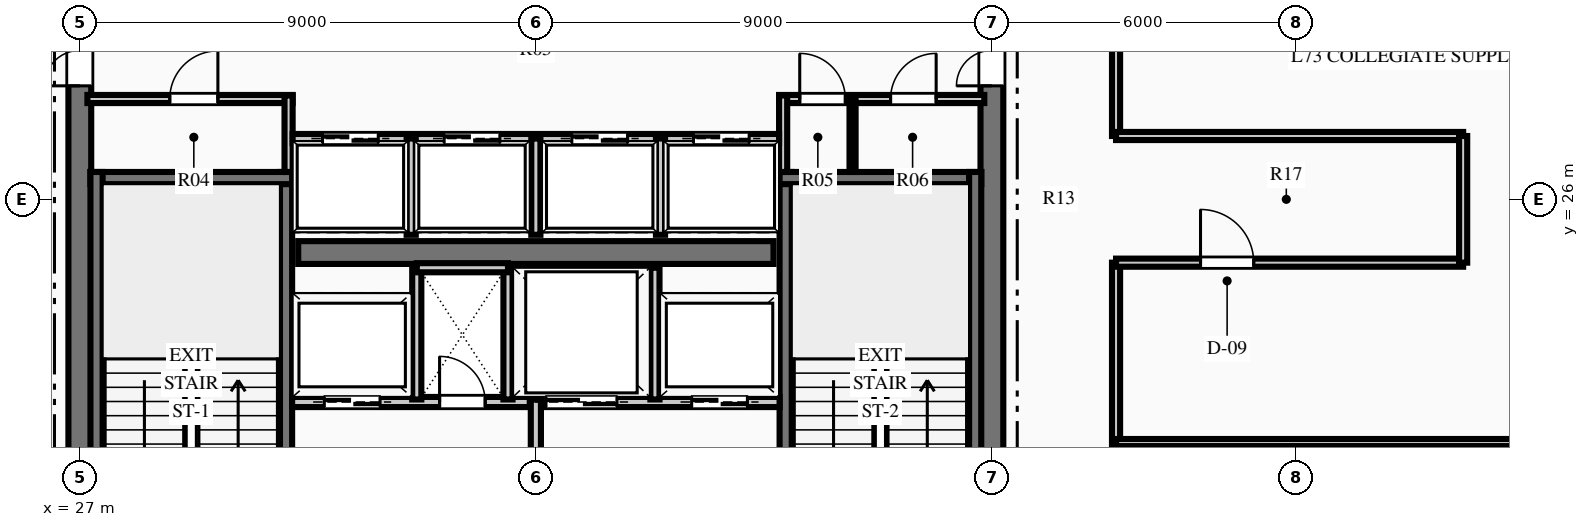
"""IFC4 building model, lengths in metres.
Left out: names, types, materials, properties, quantities, classifications, styles, units other than length and angle.
Written with IfcOpenShell. Run it as: python <this file> out.ifc"""

import sys

from ifc_helpers import new_model, si_unit, direction, frame, frame_2d, origin, place, context, subcontext, project, spatial, rectangle, extrude, element, fill, save


model = new_model("IFC4")
c1 = context("Model", 3, precision=1e-05, world=origin(), true_north=direction((0.0, 1.0)))
c2 = subcontext(c1, "Body", "Model", "MODEL_VIEW")
j1 = project(units=[si_unit("LENGTHUNIT", "METRE"), si_unit("PLANEANGLEUNIT", "RADIAN")], contexts=[c1])
p1 = place(None, origin())
s1 = spatial("IfcSite", under=j1, at=p1, CompositionType="ELEMENT")
p2 = place(p1, origin())
s2 = spatial("IfcBuilding", under=s1, at=p2, CompositionType="ELEMENT")
p3 = place(p2, frame((0.0, 0.0, 289.95)))
s3 = spatial("IfcBuildingStorey", under=s2, at=p3, CompositionType="ELEMENT", Elevation=289.95)
p4 = place(p3, frame((27.0, 18.225, 0.0), z_axis=(0.0, 0.0, 1.0), x_axis=(0.0, 1.0, 0.0)))
e1 = element("IfcWall", 1, at=p4, inside=s3, PredefinedType="SHEAR", context=c2, shape_type="SweptSolid", body=[
    extrude(rectangle(XDim=15.55, YDim=0.45, at=frame_2d((7.775, 0.0))), origin(), (0.0, 0.0, 1.0), 3.75),
])
p5 = place(p4, frame((10.015, 0.0, 0.0)))
e2 = element("IfcOpeningElement", 2, at=p5, cuts=e1, PredefinedType="OPENING", context=c2, shape_type="SweptSolid", body=[
    extrude(rectangle(XDim=1.4, YDim=2.2, at=frame_2d((0.7, 1.1))), frame((0.0, 0.235, 0.0), z_axis=(0.0, -1.0, 0.0), x_axis=(1.0, 0.0, 0.0)), (0.0, 0.0, 1.0), 0.47),
])
p6 = place(p3, frame((45.0, 18.225, 0.0), z_axis=(0.0, 0.0, 1.0), x_axis=(0.0, 1.0, 0.0)))
e3 = element("IfcWall", 3, at=p6, inside=s3, PredefinedType="SHEAR", context=c2, shape_type="SweptSolid", body=[
    extrude(rectangle(XDim=15.55, YDim=0.45, at=frame_2d((7.775, 0.0))), origin(), (0.0, 0.0, 1.0), 3.75),
])
p7 = place(p6, frame((10.015, 0.0, 0.0)))
e4 = element("IfcOpeningElement", 4, at=p7, cuts=e3, PredefinedType="OPENING", context=c2, shape_type="SweptSolid", body=[
    extrude(rectangle(XDim=1.4, YDim=2.2, at=frame_2d((0.7, 1.1))), frame((0.0, 0.235, 0.0), z_axis=(0.0, -1.0, 0.0), x_axis=(1.0, 0.0, 0.0)), (0.0, 0.0, 1.0), 0.47),
])
p8 = place(p3, frame((31.31, 24.95, 0.0), z_axis=(0.0, 0.0, 1.0), x_axis=(1.0, 0.0, 0.0)))
e5 = element("IfcWall", 5, at=p8, inside=s3, PredefinedType="SHEAR", context=c2, shape_type="SweptSolid", body=[
    extrude(rectangle(XDim=9.38, YDim=0.45, at=frame_2d((4.69, 0.0))), origin(), (0.0, 0.0, 1.0), 3.75),
])
p9 = place(p3, frame((31.07, 18.28, 0.0), z_axis=(0.0, 0.0, 1.0), x_axis=(0.0, 1.0, 0.0)))
e6 = element("IfcWall", 6, at=p9, inside=s3, PredefinedType="SHEAR", context=c2, shape_type="SweptSolid", body=[
    extrude(rectangle(XDim=8.26, YDim=0.24, at=frame_2d((4.13, 0.0))), origin(), (0.0, 0.0, 1.0), 3.75),
])
p10 = place(p9, frame((0.365, 0.0, 0.0)))
e7 = element("IfcOpeningElement", 7, at=p10, cuts=e6, PredefinedType="OPENING", context=c2, shape_type="SweptSolid", body=[
    extrude(rectangle(XDim=1.05, YDim=2.15, at=frame_2d((0.525, 1.075))), frame((0.0, 0.13, 0.0), z_axis=(0.0, -1.0, 0.0), x_axis=(1.0, 0.0, 0.0)), (0.0, 0.0, 1.0), 0.26),
])
p11 = place(p3, frame((27.21, 26.42, 0.0), z_axis=(0.0, 0.0, 1.0), x_axis=(1.0, 0.0, 0.0)))
e8 = element("IfcWall", 8, at=p11, inside=s3, PredefinedType="SHEAR", context=c2, shape_type="SweptSolid", body=[
    extrude(rectangle(XDim=3.98, YDim=0.24, at=frame_2d((1.99, 0.0))), origin(), (0.0, 0.0, 1.0), 3.75),
])
p12 = place(p3, frame((27.33, 18.28, 0.0), z_axis=(0.0, 0.0, 1.0), x_axis=(0.0, 1.0, 0.0)))
e9 = element("IfcWall", 9, at=p12, inside=s3, PredefinedType="SHEAR", context=c2, shape_type="SweptSolid", body=[
    extrude(rectangle(XDim=8.26, YDim=0.24, at=frame_2d((4.13, 0.0))), origin(), (0.0, 0.0, 1.0), 3.75),
])
p13 = place(p3, frame((40.93, 18.28, 0.0), z_axis=(0.0, 0.0, 1.0), x_axis=(0.0, 1.0, 0.0)))
e10 = element("IfcWall", 10, at=p13, inside=s3, PredefinedType="SHEAR", context=c2, shape_type="SweptSolid", body=[
    extrude(rectangle(XDim=8.26, YDim=0.24, at=frame_2d((4.13, 0.0))), origin(), (0.0, 0.0, 1.0), 3.75),
])
p14 = place(p13, frame((0.365, 0.0, 0.0)))
e11 = element("IfcOpeningElement", 11, at=p14, cuts=e10, PredefinedType="OPENING", context=c2, shape_type="SweptSolid", body=[
    extrude(rectangle(XDim=1.05, YDim=2.15, at=frame_2d((0.525, 1.075))), frame((0.0, 0.13, 0.0), z_axis=(0.0, -1.0, 0.0), x_axis=(1.0, 0.0, 0.0)), (0.0, 0.0, 1.0), 0.26),
])
p15 = place(p3, frame((40.81, 26.42, 0.0), z_axis=(0.0, 0.0, 1.0), x_axis=(1.0, 0.0, 0.0)))
e12 = element("IfcWall", 12, at=p15, inside=s3, PredefinedType="SHEAR", context=c2, shape_type="SweptSolid", body=[
    extrude(rectangle(XDim=3.98, YDim=0.24, at=frame_2d((1.99, 0.0))), origin(), (0.0, 0.0, 1.0), 3.75),
])
p16 = place(p3, frame((44.67, 18.28, 0.0), z_axis=(0.0, 0.0, 1.0), x_axis=(0.0, 1.0, 0.0)))
e13 = element("IfcWall", 13, at=p16, inside=s3, PredefinedType="SHEAR", context=c2, shape_type="SweptSolid", body=[
    extrude(rectangle(XDim=8.26, YDim=0.24, at=frame_2d((4.13, 0.0))), origin(), (0.0, 0.0, 1.0), 3.75),
])
p17 = place(p3, frame((36.0, 18.28, 0.0), z_axis=(0.0, 0.0, 1.0), x_axis=(0.0, 1.0, 0.0)))
e14 = element("IfcWall", 14, at=p17, inside=s3, PredefinedType="PARTITIONING", context=c2, shape_type="SweptSolid", body=[
    extrude(rectangle(XDim=3.77, YDim=0.2, at=frame_2d((1.885, 0.0))), origin(), (0.0, 0.0, 1.0), 3.34),
])
p18 = place(p3, frame((31.19, 22.0, 0.0), z_axis=(0.0, 0.0, 1.0), x_axis=(1.0, 0.0, 0.0)))
e15 = element("IfcWall", 15, at=p18, inside=s3, PredefinedType="PARTITIONING", context=c2, shape_type="SweptSolid", body=[
    extrude(rectangle(XDim=4.69, YDim=0.2, at=frame_2d((2.345, 0.0))), origin(), (0.0, 0.0, 1.0), 3.34),
])
p19 = place(p18, frame((2.91, 0.0, 0.0)))
e16 = element("IfcOpeningElement", 16, at=p19, cuts=e15, PredefinedType="OPENING", context=c2, shape_type="SweptSolid", body=[
    extrude(rectangle(XDim=0.9, YDim=2.15, at=frame_2d((0.45, 1.075))), frame((0.0, 0.11, 0.0), z_axis=(0.0, -1.0, 0.0), x_axis=(1.0, 0.0, 0.0)), (0.0, 0.0, 1.0), 0.22),
])
p20 = place(p18, frame((0.635, 0.0, 0.0)))
e17 = element("IfcOpeningElement", 17, at=p20, cuts=e15, PredefinedType="OPENING", context=c2, shape_type="SweptSolid", body=[
    extrude(rectangle(XDim=1.1, YDim=2.15, at=frame_2d((0.55, 1.075))), frame((0.0, 0.11, 0.0), z_axis=(0.0, -1.0, 0.0), x_axis=(1.0, 0.0, 0.0)), (0.0, 0.0, 1.0), 0.22),
])
p21 = place(p3, frame((36.12, 22.0, 0.0), z_axis=(0.0, 0.0, 1.0), x_axis=(1.0, 0.0, 0.0)))
e18 = element("IfcWall", 18, at=p21, inside=s3, PredefinedType="PARTITIONING", context=c2, shape_type="SweptSolid", body=[
    extrude(rectangle(XDim=4.69, YDim=0.2, at=frame_2d((2.345, 0.0))), origin(), (0.0, 0.0, 1.0), 3.34),
])
p22 = place(p21, frame((2.955, 0.0, 0.0)))
e19 = element("IfcOpeningElement", 19, at=p22, cuts=e18, PredefinedType="OPENING", context=c2, shape_type="SweptSolid", body=[
    extrude(rectangle(XDim=1.1, YDim=2.15, at=frame_2d((0.55, 1.075))), frame((0.0, 0.11, 0.0), z_axis=(0.0, -1.0, 0.0), x_axis=(1.0, 0.0, 0.0)), (0.0, 0.0, 1.0), 0.22),
])
p23 = place(p21, frame((0.08, 0.0, 0.0)))
e20 = element("IfcOpeningElement", 20, at=p23, cuts=e18, PredefinedType="OPENING", context=c2, shape_type="SweptSolid", body=[
    extrude(rectangle(XDim=1.4, YDim=2.2, at=frame_2d((0.7, 1.1))), frame((0.0, 0.11, 0.0), z_axis=(0.0, -1.0, 0.0), x_axis=(1.0, 0.0, 0.0)), (0.0, 0.0, 1.0), 0.22),
])
for number, where, z_axis, x_axis in (
    (21, (33.65, 22.05, 0.0), (0.0, 0.0, 1.0), (0.0, 1.0, 0.0)),
    (22, (35.45, 22.05, 0.0), (0.0, 0.0, 1.0), (0.0, 1.0, 0.0)),
):
    element("IfcWall", number, at=place(p3, frame(where, z_axis=z_axis, x_axis=x_axis)), inside=s3, PredefinedType="PARTITIONING", context=c2, shape_type="SweptSolid", body=[
        extrude(rectangle(XDim=2.6, YDim=0.18, at=frame_2d((1.3, 0.0))), origin(), (0.0, 0.0, 1.0), 3.34),
    ])
p24 = place(p3, frame((33.65, 24.65, 0.0), z_axis=(0.0, 0.0, 1.0), x_axis=(1.0, 0.0, 0.0)))
e23 = element("IfcWall", 23, at=p24, inside=s3, PredefinedType="PARTITIONING", context=c2, shape_type="SweptSolid", body=[
    extrude(rectangle(XDim=1.8, YDim=0.18, at=frame_2d((0.9, 0.0))), origin(), (0.0, 0.0, 1.0), 3.34),
])
p25 = place(p3, frame((38.35, 22.05, 0.0), z_axis=(0.0, 0.0, 1.0), x_axis=(0.0, 1.0, 0.0)))
e24 = element("IfcWall", 24, at=p25, inside=s3, PredefinedType="PARTITIONING", context=c2, shape_type="SweptSolid", body=[
    extrude(rectangle(XDim=2.6, YDim=0.18, at=frame_2d((1.3, 0.0))), origin(), (0.0, 0.0, 1.0), 3.34),
])
p26 = place(p3, frame((27.15, 27.98, 0.0), z_axis=(0.0, 0.0, 1.0), x_axis=(1.0, 0.0, 0.0)))
e25 = element("IfcWall", 25, at=p26, inside=s3, PredefinedType="PARTITIONING", context=c2, shape_type="SweptSolid", body=[
    extrude(rectangle(XDim=4.05, YDim=0.16, at=frame_2d((2.025, 0.0))), origin(), (0.0, 0.0, 1.0), 3.34),
])
p27 = place(p26, frame((1.625, 0.0, 0.0)))
e26 = element("IfcOpeningElement", 26, at=p27, cuts=e25, PredefinedType="OPENING", context=c2, shape_type="SweptSolid", body=[
    extrude(rectangle(XDim=0.95, YDim=2.15, at=frame_2d((0.475, 1.075))), frame((0.0, 0.09, 0.0), z_axis=(0.0, -1.0, 0.0), x_axis=(1.0, 0.0, 0.0)), (0.0, 0.0, 1.0), 0.18),
])
p28 = place(p3, frame((31.12, 26.54, 0.0), z_axis=(0.0, 0.0, 1.0), x_axis=(0.0, 1.0, 0.0)))
e27 = element("IfcWall", 27, at=p28, inside=s3, PredefinedType="PARTITIONING", context=c2, shape_type="SweptSolid", body=[
    extrude(rectangle(XDim=1.51, YDim=0.16, at=frame_2d((0.755, 0.0))), origin(), (0.0, 0.0, 1.0), 3.34),
])
p29 = place(p3, frame((40.8, 27.98, 0.0), z_axis=(0.0, 0.0, 1.0), x_axis=(1.0, 0.0, 0.0)))
e28 = element("IfcWall", 28, at=p29, inside=s3, PredefinedType="PARTITIONING", context=c2, shape_type="SweptSolid", body=[
    extrude(rectangle(XDim=4.05, YDim=0.16, at=frame_2d((2.025, 0.0))), origin(), (0.0, 0.0, 1.0), 3.34),
])
p30 = place(p29, frame((0.407, 0.0, 0.0)))
e29 = element("IfcOpeningElement", 29, at=p30, cuts=e28, PredefinedType="OPENING", context=c2, shape_type="SweptSolid", body=[
    extrude(rectangle(XDim=0.9, YDim=2.15, at=frame_2d((0.45, 1.075))), frame((0.0, 0.09, 0.0), z_axis=(0.0, -1.0, 0.0), x_axis=(1.0, 0.0, 0.0)), (0.0, 0.0, 1.0), 0.18),
])
p31 = place(p29, frame((2.2, 0.0, 0.0)))
e30 = element("IfcOpeningElement", 30, at=p31, cuts=e28, PredefinedType="OPENING", context=c2, shape_type="SweptSolid", body=[
    extrude(rectangle(XDim=0.9, YDim=2.15, at=frame_2d((0.45, 1.075))), frame((0.0, 0.09, 0.0), z_axis=(0.0, -1.0, 0.0), x_axis=(1.0, 0.0, 0.0)), (0.0, 0.0, 1.0), 0.18),
])
p32 = place(p3, frame((40.88, 26.54, 0.0), z_axis=(0.0, 0.0, 1.0), x_axis=(0.0, 1.0, 0.0)))
e31 = element("IfcWall", 31, at=p32, inside=s3, PredefinedType="PARTITIONING", context=c2, shape_type="SweptSolid", body=[
    extrude(rectangle(XDim=1.51, YDim=0.16, at=frame_2d((0.755, 0.0))), origin(), (0.0, 0.0, 1.0), 3.34),
])
p33 = place(p3, frame((42.25, 26.54, 0.0), z_axis=(0.0, 0.0, 1.0), x_axis=(0.0, 1.0, 0.0)))
e32 = element("IfcWall", 32, at=p33, inside=s3, PredefinedType="PARTITIONING", context=c2, shape_type="SweptSolid", body=[
    extrude(rectangle(XDim=1.44, YDim=0.12, at=frame_2d((0.72, 0.0))), origin(), (0.0, 0.0, 1.0), 3.34),
])
p34 = place(p3, frame((31.2, 27.2, 0.0), z_axis=(0.0, 0.0, 1.0), x_axis=(1.0, 0.0, 0.0)))
e33 = element("IfcWall", 33, at=p34, inside=s3, PredefinedType="PARTITIONING", context=c2, shape_type="SweptSolid", body=[
    extrude(rectangle(XDim=9.6, YDim=0.18, at=frame_2d((4.8, 0.0))), origin(), (0.0, 0.0, 1.0), 3.34),
])
p35 = place(p34, frame((0.59, 0.0, 0.0)))
e34 = element("IfcOpeningElement", 34, at=p35, cuts=e33, PredefinedType="OPENING", context=c2, shape_type="SweptSolid", body=[
    extrude(rectangle(XDim=1.1, YDim=2.15, at=frame_2d((0.55, 1.075))), frame((0.0, 0.1, 0.0), z_axis=(0.0, -1.0, 0.0), x_axis=(1.0, 0.0, 0.0)), (0.0, 0.0, 1.0), 0.2),
])
p36 = place(p34, frame((2.99, 0.0, 0.0)))
e35 = element("IfcOpeningElement", 35, at=p36, cuts=e33, PredefinedType="OPENING", context=c2, shape_type="SweptSolid", body=[
    extrude(rectangle(XDim=1.1, YDim=2.15, at=frame_2d((0.55, 1.075))), frame((0.0, 0.1, 0.0), z_axis=(0.0, -1.0, 0.0), x_axis=(1.0, 0.0, 0.0)), (0.0, 0.0, 1.0), 0.2),
])
p37 = place(p34, frame((5.51, 0.0, 0.0)))
e36 = element("IfcOpeningElement", 36, at=p37, cuts=e33, PredefinedType="OPENING", context=c2, shape_type="SweptSolid", body=[
    extrude(rectangle(XDim=1.1, YDim=2.15, at=frame_2d((0.55, 1.075))), frame((0.0, 0.1, 0.0), z_axis=(0.0, -1.0, 0.0), x_axis=(1.0, 0.0, 0.0)), (0.0, 0.0, 1.0), 0.2),
])
p38 = place(p34, frame((7.91, 0.0, 0.0)))
e37 = element("IfcOpeningElement", 37, at=p38, cuts=e33, PredefinedType="OPENING", context=c2, shape_type="SweptSolid", body=[
    extrude(rectangle(XDim=1.1, YDim=2.15, at=frame_2d((0.55, 1.075))), frame((0.0, 0.1, 0.0), z_axis=(0.0, -1.0, 0.0), x_axis=(1.0, 0.0, 0.0)), (0.0, 0.0, 1.0), 0.2),
])
for number, where, z_axis, x_axis in (
    (38, (33.54, 25.3, 0.0), (0.0, 0.0, 1.0), (0.0, 1.0, 0.0)),
    (39, (36.0, 25.3, 0.0), (0.0, 0.0, 1.0), (0.0, 1.0, 0.0)),
    (40, (38.46, 25.3, 0.0), (0.0, 0.0, 1.0), (0.0, 1.0, 0.0)),
):
    element("IfcWall", number, at=place(p3, frame(where, z_axis=z_axis, x_axis=x_axis)), inside=s3, PredefinedType="PARTITIONING", context=c2, shape_type="SweptSolid", body=[
        extrude(rectangle(XDim=1.9, YDim=0.18, at=frame_2d((0.95, 0.0))), origin(), (0.0, 0.0, 1.0), 3.34),
    ])
p39 = place(p3, frame((47.45, 15.55, 0.0), z_axis=(0.0, 0.0, 1.0), x_axis=(0.0, 1.0, 0.0)))
e41 = element("IfcWall", 41, at=p39, inside=s3, PredefinedType="PARTITIONING", context=c2, shape_type="SweptSolid", body=[
    extrude(rectangle(XDim=9.2, YDim=0.16, at=frame_2d((4.6, 0.0))), origin(), (0.0, 0.0, 1.0), 3.34),
])
p40 = place(p39, frame((1.389, 0.0, 0.0)))
e42 = element("IfcOpeningElement", 42, at=p40, cuts=e41, PredefinedType="OPENING", context=c2, shape_type="SweptSolid", body=[
    extrude(rectangle(XDim=1.05, YDim=2.15, at=frame_2d((0.525, 1.075))), frame((0.0, 0.09, 0.0), z_axis=(0.0, -1.0, 0.0), x_axis=(1.0, 0.0, 0.0)), (0.0, 0.0, 1.0), 0.18),
])
p41 = place(p3, frame((47.45, 27.25, 0.0), z_axis=(0.0, 0.0, 1.0), x_axis=(0.0, 1.0, 0.0)))
e43 = element("IfcWall", 43, at=p41, inside=s3, PredefinedType="PARTITIONING", context=c2, shape_type="SweptSolid", body=[
    extrude(rectangle(XDim=9.2, YDim=0.16, at=frame_2d((4.6, 0.0))), origin(), (0.0, 0.0, 1.0), 3.34),
])
p42 = place(p41, frame((3.927, 0.0, 0.0)))
e44 = element("IfcOpeningElement", 44, at=p42, cuts=e43, PredefinedType="OPENING", context=c2, shape_type="SweptSolid", body=[
    extrude(rectangle(XDim=1.05, YDim=2.15, at=frame_2d((0.525, 1.075))), frame((0.0, 0.09, 0.0), z_axis=(0.0, -1.0, 0.0), x_axis=(1.0, 0.0, 0.0)), (0.0, 0.0, 1.0), 0.18),
])
p43 = place(p3, frame((47.45, 24.75, 0.0), z_axis=(0.0, 0.0, 1.0), x_axis=(1.0, 0.0, 0.0)))
e45 = element("IfcWall", 45, at=p43, inside=s3, PredefinedType="PARTITIONING", context=c2, shape_type="SweptSolid", body=[
    extrude(rectangle(XDim=6.85, YDim=0.16, at=frame_2d((3.425, 0.0))), origin(), (0.0, 0.0, 1.0), 3.34),
])
p44 = place(p43, frame((1.667, 0.0, 0.0)))
e46 = element("IfcOpeningElement", 46, at=p44, cuts=e45, PredefinedType="OPENING", context=c2, shape_type="SweptSolid", body=[
    extrude(rectangle(XDim=1.05, YDim=2.15, at=frame_2d((0.525, 1.075))), frame((0.0, 0.09, 0.0), z_axis=(0.0, -1.0, 0.0), x_axis=(1.0, 0.0, 0.0)), (0.0, 0.0, 1.0), 0.18),
])
p45 = place(p3, frame((47.45, 27.25, 0.0), z_axis=(0.0, 0.0, 1.0), x_axis=(1.0, 0.0, 0.0)))
e47 = element("IfcWall", 47, at=p45, inside=s3, PredefinedType="PARTITIONING", context=c2, shape_type="SweptSolid", body=[
    extrude(rectangle(XDim=6.85, YDim=0.16, at=frame_2d((3.425, 0.0))), origin(), (0.0, 0.0, 1.0), 3.34),
])
p46 = place(p3, frame((54.3, 24.75, 0.0), z_axis=(0.0, 0.0, 1.0), x_axis=(0.0, 1.0, 0.0)))
e48 = element("IfcWall", 48, at=p46, inside=s3, PredefinedType="PARTITIONING", context=c2, shape_type="SweptSolid", body=[
    extrude(rectangle(XDim=2.5, YDim=0.16, at=frame_2d((1.25, 0.0))), origin(), (0.0, 0.0, 1.0), 3.34),
])
p47 = place(p3, frame((47.45, 21.2, 0.0), z_axis=(0.0, 0.0, 1.0), x_axis=(1.0, 0.0, 0.0)))
e49 = element("IfcWall", 49, at=p47, inside=s3, PredefinedType="PARTITIONING", context=c2, shape_type="SweptSolid", body=[
    extrude(rectangle(XDim=10.824, YDim=0.14, at=frame_2d((5.412, 0.0))), origin(), (0.0, 0.0, 1.0), 3.34),
])
p48 = place(p27, origin())
e50 = element("IfcDoor", 50, at=p48, inside=s3, OperationType="SINGLE_SWING_RIGHT", PredefinedType="DOOR", context=c2, shape_type="SweptSolid", body=[
    extrude(rectangle(XDim=0.95, YDim=2.15, at=frame_2d((0.475, 1.075))), frame((0.0, 0.025, 0.0), z_axis=(0.0, -1.0, 0.0), x_axis=(1.0, 0.0, 0.0)), (0.0, 0.0, 1.0), 0.05),
])
fill(e26, e50)
p49 = place(p30, origin())
e51 = element("IfcDoor", 51, at=p49, inside=s3, OperationType="SINGLE_SWING_LEFT", PredefinedType="DOOR", context=c2, shape_type="SweptSolid", body=[
    extrude(rectangle(XDim=0.9, YDim=2.15, at=frame_2d((0.45, 1.075))), frame((0.0, 0.025, 0.0), z_axis=(0.0, -1.0, 0.0), x_axis=(1.0, 0.0, 0.0)), (0.0, 0.0, 1.0), 0.05),
])
fill(e29, e51)
p50 = place(p31, origin())
e52 = element("IfcDoor", 52, at=p50, inside=s3, OperationType="SINGLE_SWING_RIGHT", PredefinedType="DOOR", context=c2, shape_type="SweptSolid", body=[
    extrude(rectangle(XDim=0.9, YDim=2.15, at=frame_2d((0.45, 1.075))), frame((0.0, 0.025, 0.0), z_axis=(0.0, -1.0, 0.0), x_axis=(1.0, 0.0, 0.0)), (0.0, 0.0, 1.0), 0.05),
])
fill(e30, e52)
p51 = place(p19, origin())
e53 = element("IfcDoor", 53, at=p51, inside=s3, OperationType="SINGLE_SWING_LEFT", PredefinedType="DOOR", context=c2, shape_type="SweptSolid", body=[
    extrude(rectangle(XDim=0.9, YDim=2.15, at=frame_2d((0.45, 1.075))), frame((0.0, 0.025, 0.0), z_axis=(0.0, -1.0, 0.0), x_axis=(1.0, 0.0, 0.0)), (0.0, 0.0, 1.0), 0.05),
])
fill(e16, e53)
p52 = place(p5, origin())
e54 = element("IfcDoor", 54, at=p52, inside=s3, OperationType="DOUBLE_DOOR_SINGLE_SWING", PredefinedType="DOOR", context=c2, shape_type="SweptSolid", body=[
    extrude(rectangle(XDim=1.4, YDim=2.2, at=frame_2d((0.7, 1.1))), frame((0.0, 0.025, 0.0), z_axis=(0.0, -1.0, 0.0), x_axis=(1.0, 0.0, 0.0)), (0.0, 0.0, 1.0), 0.05),
])
fill(e2, e54)
p53 = place(p7, origin())
e55 = element("IfcDoor", 55, at=p53, inside=s3, OperationType="DOUBLE_DOOR_SINGLE_SWING", PredefinedType="DOOR", context=c2, shape_type="SweptSolid", body=[
    extrude(rectangle(XDim=1.4, YDim=2.2, at=frame_2d((0.7, 1.1))), frame((0.0, 0.025, 0.0), z_axis=(0.0, -1.0, 0.0), x_axis=(1.0, 0.0, 0.0)), (0.0, 0.0, 1.0), 0.05),
])
fill(e4, e55)
p54 = place(p44, origin())
e56 = element("IfcDoor", 56, at=p54, inside=s3, OperationType="SINGLE_SWING_LEFT", PredefinedType="DOOR", context=c2, shape_type="SweptSolid", body=[
    extrude(rectangle(XDim=1.05, YDim=2.15, at=frame_2d((0.525, 1.075))), frame((0.0, 0.025, 0.0), z_axis=(0.0, -1.0, 0.0), x_axis=(1.0, 0.0, 0.0)), (0.0, 0.0, 1.0), 0.05),
])
fill(e46, e56)
p55 = place(p35, origin())
e57 = element("IfcDoor", 57, at=p55, inside=s3, OperationType="SLIDING_TO_LEFT", PredefinedType="DOOR", context=c2, shape_type="SweptSolid", body=[
    extrude(rectangle(XDim=1.1, YDim=2.15, at=frame_2d((0.55, 1.075))), frame((0.0, 0.025, 0.0), z_axis=(0.0, -1.0, 0.0), x_axis=(1.0, 0.0, 0.0)), (0.0, 0.0, 1.0), 0.05),
])
fill(e34, e57)
p56 = place(p36, origin())
e58 = element("IfcDoor", 58, at=p56, inside=s3, OperationType="SLIDING_TO_LEFT", PredefinedType="DOOR", context=c2, shape_type="SweptSolid", body=[
    extrude(rectangle(XDim=1.1, YDim=2.15, at=frame_2d((0.55, 1.075))), frame((0.0, 0.025, 0.0), z_axis=(0.0, -1.0, 0.0), x_axis=(1.0, 0.0, 0.0)), (0.0, 0.0, 1.0), 0.05),
])
fill(e35, e58)
p57 = place(p37, origin())
e59 = element("IfcDoor", 59, at=p57, inside=s3, OperationType="SLIDING_TO_LEFT", PredefinedType="DOOR", context=c2, shape_type="SweptSolid", body=[
    extrude(rectangle(XDim=1.1, YDim=2.15, at=frame_2d((0.55, 1.075))), frame((0.0, 0.025, 0.0), z_axis=(0.0, -1.0, 0.0), x_axis=(1.0, 0.0, 0.0)), (0.0, 0.0, 1.0), 0.05),
])
fill(e36, e59)
p58 = place(p38, origin())
e60 = element("IfcDoor", 60, at=p58, inside=s3, OperationType="SLIDING_TO_LEFT", PredefinedType="DOOR", context=c2, shape_type="SweptSolid", body=[
    extrude(rectangle(XDim=1.1, YDim=2.15, at=frame_2d((0.55, 1.075))), frame((0.0, 0.025, 0.0), z_axis=(0.0, -1.0, 0.0), x_axis=(1.0, 0.0, 0.0)), (0.0, 0.0, 1.0), 0.05),
])
fill(e37, e60)
p59 = place(p20, origin())
e61 = element("IfcDoor", 61, at=p59, inside=s3, OperationType="SLIDING_TO_LEFT", PredefinedType="DOOR", context=c2, shape_type="SweptSolid", body=[
    extrude(rectangle(XDim=1.1, YDim=2.15, at=frame_2d((0.55, 1.075))), frame((0.0, 0.025, 0.0), z_axis=(0.0, -1.0, 0.0), x_axis=(1.0, 0.0, 0.0)), (0.0, 0.0, 1.0), 0.05),
])
fill(e17, e61)
p60 = place(p22, origin())
e62 = element("IfcDoor", 62, at=p60, inside=s3, OperationType="SLIDING_TO_LEFT", PredefinedType="DOOR", context=c2, shape_type="SweptSolid", body=[
    extrude(rectangle(XDim=1.1, YDim=2.15, at=frame_2d((0.55, 1.075))), frame((0.0, 0.025, 0.0), z_axis=(0.0, -1.0, 0.0), x_axis=(1.0, 0.0, 0.0)), (0.0, 0.0, 1.0), 0.05),
])
fill(e19, e62)
p61 = place(p23, origin())
e63 = element("IfcDoor", 63, at=p61, inside=s3, OperationType="SLIDING_TO_LEFT", PredefinedType="DOOR", context=c2, shape_type="SweptSolid", body=[
    extrude(rectangle(XDim=1.4, YDim=2.2, at=frame_2d((0.7, 1.1))), frame((0.0, 0.025, 0.0), z_axis=(0.0, -1.0, 0.0), x_axis=(1.0, 0.0, 0.0)), (0.0, 0.0, 1.0), 0.05),
])
fill(e20, e63)
save(model, sys.argv[1])
